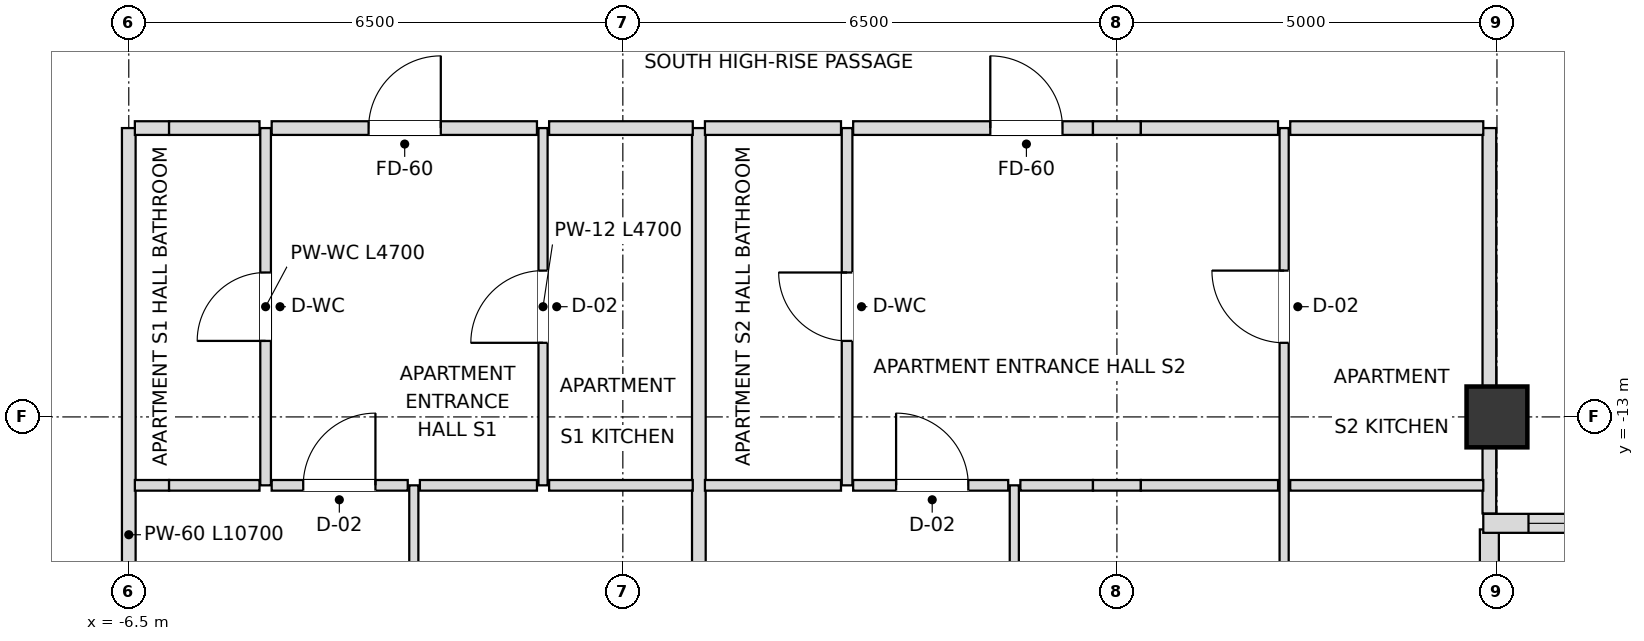
"""IFC4 building model, lengths in metres.
Left out: names, types, materials, properties, quantities, classifications, styles, units other than length and angle.
Written with IfcOpenShell. Run it as: python <this file> out.ifc"""

import sys

from ifc_helpers import new_model, si_unit, direction, frame, frame_2d, origin, origin_2d, place, context, subcontext, project, spatial, rectangle, extrude, element, fill, save


model = new_model("IFC4")
c1 = context("Model", 3, precision=1e-05, world=origin(), true_north=direction((0.0, 1.0)))
c2 = subcontext(c1, "Body", "Model", "MODEL_VIEW")
j1 = project(units=[si_unit("LENGTHUNIT", "METRE"), si_unit("PLANEANGLEUNIT", "RADIAN")], contexts=[c1])
p1 = place(None, origin())
s1 = spatial("IfcSite", under=j1, at=p1, CompositionType="ELEMENT")
p2 = place(p1, origin())
s2 = spatial("IfcBuilding", under=s1, at=p2, CompositionType="ELEMENT")
p3 = place(p2, frame((0.0, 0.0, 301.5)))
s3 = spatial("IfcBuildingStorey", under=s2, at=p3, CompositionType="ELEMENT", Elevation=301.5)
p4 = place(p3, frame((11.5, -13.0, 0.0), z_axis=(0.0, 0.0, 1.0), x_axis=(1.0, 0.0, 0.0)))
e1 = element("IfcColumn", 1, at=p4, inside=s3, PredefinedType="COLUMN", context=c2, shape_type="SweptSolid", body=[
    extrude(rectangle(XDim=0.8, YDim=0.8, at=origin_2d()), origin(), (0.0, 0.0, 1.0), 3.6),
])
p5 = place(p3, frame((11.4, -19.82, 0.0), z_axis=(0.0, 0.0, 1.0), x_axis=(0.0, 1.0, 0.0)))
e2 = element("IfcWall", 2, at=p5, inside=s3, PredefinedType="SOLIDWALL", context=c2, shape_type="SweptSolid", body=[
    extrude(rectangle(XDim=5.34, YDim=0.25, at=frame_2d((2.67, 0.0))), origin(), (0.0, 0.0, 1.0), 2.668),
])
p6 = place(p5, frame((1.925, 0.0, 0.72)))
e3 = element("IfcOpeningElement", 3, at=p6, cuts=e2, PredefinedType="OPENING", context=c2, shape_type="SweptSolid", body=[
    extrude(rectangle(XDim=1.8, YDim=1.68, at=frame_2d((0.9, 0.84))), frame((0.0, 0.135, 0.0), z_axis=(0.0, -1.0, 0.0), x_axis=(1.0, 0.0, 0.0)), (0.0, 0.0, 1.0), 0.27),
])
p7 = place(p3, frame((11.32, -14.4, 0.0), z_axis=(0.0, 0.0, 1.0), x_axis=(1.0, 0.0, 0.0)))
e4 = element("IfcWall", 4, at=p7, inside=s3, PredefinedType="SOLIDWALL", context=c2, shape_type="SweptSolid", body=[
    extrude(rectangle(XDim=5.66, YDim=0.25, at=frame_2d((2.83, 0.0))), origin(), (0.0, 0.0, 1.0), 2.668),
])
p8 = place(p7, frame((0.595, 0.0, 0.72)))
e5 = element("IfcOpeningElement", 5, at=p8, cuts=e4, PredefinedType="OPENING", context=c2, shape_type="SweptSolid", body=[
    extrude(rectangle(XDim=1.8, YDim=1.68, at=frame_2d((0.9, 0.84))), frame((0.0, 0.135, 0.0), z_axis=(0.0, -1.0, 0.0), x_axis=(1.0, 0.0, 0.0)), (0.0, 0.0, 1.0), 0.27),
])
p9 = place(p7, frame((3.265, 0.0, 0.72)))
e6 = element("IfcOpeningElement", 6, at=p9, cuts=e4, PredefinedType="OPENING", context=c2, shape_type="SweptSolid", body=[
    extrude(rectangle(XDim=1.8, YDim=1.68, at=frame_2d((0.9, 0.84))), frame((0.0, 0.135, 0.0), z_axis=(0.0, -1.0, 0.0), x_axis=(1.0, 0.0, 0.0)), (0.0, 0.0, 1.0), 0.27),
])
p10 = place(p3, frame((-6.5, -19.9, 0.0), z_axis=(0.0, 0.0, 1.0), x_axis=(0.0, 1.0, 0.0)))
e7 = element("IfcWall", 7, at=p10, inside=s3, PredefinedType="PARTITIONING", context=c2, shape_type="SweptSolid", body=[
    extrude(rectangle(XDim=10.7, YDim=0.18, at=frame_2d((5.35, 0.0))), origin(), (0.0, 0.0, 1.0), 1.485),
])
p11 = place(p3, frame((-4.7, -13.9, 0.0), z_axis=(0.0, 0.0, 1.0), x_axis=(0.0, 1.0, 0.0)))
e8 = element("IfcWall", 8, at=p11, inside=s3, PredefinedType="PARTITIONING", context=c2, shape_type="SweptSolid", body=[
    extrude(rectangle(XDim=4.7, YDim=0.14, at=frame_2d((2.35, 0.0))), origin(), (0.0, 0.0, 1.0), 3.3),
])
p12 = place(p11, frame((1.9, 0.0, 0.0)))
e9 = element("IfcOpeningElement", 9, at=p12, cuts=e8, PredefinedType="OPENING", context=c2, shape_type="SweptSolid", body=[
    extrude(rectangle(XDim=0.9, YDim=2.1, at=frame_2d((0.45, 1.05))), frame((0.0, 0.08, 0.0), z_axis=(0.0, -1.0, 0.0), x_axis=(1.0, 0.0, 0.0)), (0.0, 0.0, 1.0), 0.16),
])
p13 = place(p3, frame((-2.75, -19.9, 0.0), z_axis=(0.0, 0.0, 1.0), x_axis=(0.0, 1.0, 0.0)))
e10 = element("IfcWall", 10, at=p13, inside=s3, PredefinedType="PARTITIONING", context=c2, shape_type="SweptSolid", body=[
    extrude(rectangle(XDim=6.0, YDim=0.12, at=frame_2d((3.0, 0.0))), origin(), (0.0, 0.0, 1.0), 3.3),
])
p14 = place(p13, frame((2.55, 0.0, 0.0)))
e11 = element("IfcOpeningElement", 11, at=p14, cuts=e10, PredefinedType="OPENING", context=c2, shape_type="SweptSolid", body=[
    extrude(rectangle(XDim=0.9, YDim=2.1, at=frame_2d((0.45, 1.05))), frame((0.0, 0.07, 0.0), z_axis=(0.0, -1.0, 0.0), x_axis=(1.0, 0.0, 0.0)), (0.0, 0.0, 1.0), 0.14),
])
p15 = place(p3, frame((-1.05, -13.9, 0.0), z_axis=(0.0, 0.0, 1.0), x_axis=(0.0, 1.0, 0.0)))
e12 = element("IfcWall", 12, at=p15, inside=s3, PredefinedType="PARTITIONING", context=c2, shape_type="SweptSolid", body=[
    extrude(rectangle(XDim=4.7, YDim=0.12, at=frame_2d((2.35, 0.0))), origin(), (0.0, 0.0, 1.0), 3.3),
])
p16 = place(p15, frame((1.875, 0.0, 0.0)))
e13 = element("IfcOpeningElement", 13, at=p16, cuts=e12, PredefinedType="OPENING", context=c2, shape_type="SweptSolid", body=[
    extrude(rectangle(XDim=0.95, YDim=2.1, at=frame_2d((0.475, 1.05))), frame((0.0, 0.07, 0.0), z_axis=(0.0, -1.0, 0.0), x_axis=(1.0, 0.0, 0.0)), (0.0, 0.0, 1.0), 0.14),
])
p17 = place(p3, frame((1.0, -19.9, 0.0), z_axis=(0.0, 0.0, 1.0), x_axis=(0.0, 1.0, 0.0)))
e14 = element("IfcWall", 14, at=p17, inside=s3, PredefinedType="PARTITIONING", context=c2, shape_type="SweptSolid", body=[
    extrude(rectangle(XDim=10.7, YDim=0.18, at=frame_2d((5.35, 0.0))), origin(), (0.0, 0.0, 1.0), 3.3),
])
p18 = place(p3, frame((2.95, -13.9, 0.0), z_axis=(0.0, 0.0, 1.0), x_axis=(0.0, 1.0, 0.0)))
e15 = element("IfcWall", 15, at=p18, inside=s3, PredefinedType="PARTITIONING", context=c2, shape_type="SweptSolid", body=[
    extrude(rectangle(XDim=4.7, YDim=0.14, at=frame_2d((2.35, 0.0))), origin(), (0.0, 0.0, 1.0), 3.3),
])
p19 = place(p18, frame((1.9, 0.0, 0.0)))
e16 = element("IfcOpeningElement", 16, at=p19, cuts=e15, PredefinedType="OPENING", context=c2, shape_type="SweptSolid", body=[
    extrude(rectangle(XDim=0.9, YDim=2.1, at=frame_2d((0.45, 1.05))), frame((0.0, 0.08, 0.0), z_axis=(0.0, -1.0, 0.0), x_axis=(1.0, 0.0, 0.0)), (0.0, 0.0, 1.0), 0.16),
])
p20 = place(p3, frame((5.15, -19.9, 0.0), z_axis=(0.0, 0.0, 1.0), x_axis=(0.0, 1.0, 0.0)))
e17 = element("IfcWall", 17, at=p20, inside=s3, PredefinedType="PARTITIONING", context=c2, shape_type="SweptSolid", body=[
    extrude(rectangle(XDim=6.0, YDim=0.12, at=frame_2d((3.0, 0.0))), origin(), (0.0, 0.0, 1.0), 3.3),
])
p21 = place(p20, frame((2.55, 0.0, 0.0)))
e18 = element("IfcOpeningElement", 18, at=p21, cuts=e17, PredefinedType="OPENING", context=c2, shape_type="SweptSolid", body=[
    extrude(rectangle(XDim=0.9, YDim=2.1, at=frame_2d((0.45, 1.05))), frame((0.0, 0.07, 0.0), z_axis=(0.0, -1.0, 0.0), x_axis=(1.0, 0.0, 0.0)), (0.0, 0.0, 1.0), 0.14),
])
p22 = place(p3, frame((8.7, -19.9, 0.0), z_axis=(0.0, 0.0, 1.0), x_axis=(0.0, 1.0, 0.0)))
e19 = element("IfcWall", 19, at=p22, inside=s3, PredefinedType="PARTITIONING", context=c2, shape_type="SweptSolid", body=[
    extrude(rectangle(XDim=10.7, YDim=0.12, at=frame_2d((5.35, 0.0))), origin(), (0.0, 0.0, 1.0), 2.353),
])
p23 = place(p22, frame((7.875, 0.0, 0.0)))
e20 = element("IfcOpeningElement", 20, at=p23, cuts=e19, PredefinedType="OPENING", context=c2, shape_type="SweptSolid", body=[
    extrude(rectangle(XDim=0.95, YDim=2.1, at=frame_2d((0.475, 1.05))), frame((0.0, 0.07, 0.0), z_axis=(0.0, -1.0, 0.0), x_axis=(1.0, 0.0, 0.0)), (0.0, 0.0, 1.0), 0.14),
])
p24 = place(p22, frame((2.55, 0.0, 0.0)))
e21 = element("IfcOpeningElement", 21, at=p24, cuts=e19, PredefinedType="OPENING", context=c2, shape_type="SweptSolid", body=[
    extrude(rectangle(XDim=0.9, YDim=2.1, at=frame_2d((0.45, 1.05))), frame((0.0, 0.07, 0.0), z_axis=(0.0, -1.0, 0.0), x_axis=(1.0, 0.0, 0.0)), (0.0, 0.0, 1.0), 0.14),
])
p25 = place(p3, frame((11.4, -14.27, 0.0), z_axis=(0.0, 0.0, 1.0), x_axis=(0.0, 1.0, 0.0)))
e22 = element("IfcWall", 22, at=p25, inside=s3, PredefinedType="PARTITIONING", context=c2, shape_type="SweptSolid", body=[
    extrude(rectangle(XDim=5.07, YDim=0.18, at=frame_2d((2.535, 0.0))), origin(), (0.0, 0.0, 1.0), 2.353),
])
p26 = place(p3, frame((-6.42, -13.9, 0.0), z_axis=(0.0, 0.0, 1.0), x_axis=(1.0, 0.0, 0.0)))
e23 = element("IfcWall", 23, at=p26, inside=s3, PredefinedType="PARTITIONING", context=c2, shape_type="SweptSolid", body=[
    extrude(rectangle(XDim=0.45, YDim=0.14, at=frame_2d((0.225, 0.0))), origin(), (0.0, 0.0, 1.0), 1.485),
])
p27 = place(p3, frame((-5.97, -13.9, 0.0), z_axis=(0.0, 0.0, 1.0), x_axis=(1.0, 0.0, 0.0)))
e24 = element("IfcWall", 24, at=p27, inside=s3, PredefinedType="PARTITIONING", context=c2, shape_type="SweptSolid", body=[
    extrude(rectangle(XDim=1.19, YDim=0.14, at=frame_2d((0.595, 0.0))), origin(), (0.0, 0.0, 1.0), 3.3),
])
p28 = place(p3, frame((-4.62, -13.9, 0.0), z_axis=(0.0, 0.0, 1.0), x_axis=(1.0, 0.0, 0.0)))
e25 = element("IfcWall", 25, at=p28, inside=s3, PredefinedType="PARTITIONING", context=c2, shape_type="SweptSolid", body=[
    extrude(rectangle(XDim=1.79, YDim=0.14, at=frame_2d((0.895, 0.0))), origin(), (0.0, 0.0, 1.0), 3.3),
])
p29 = place(p28, frame((0.415, 0.0, 0.0)))
e26 = element("IfcOpeningElement", 26, at=p29, cuts=e25, PredefinedType="OPENING", context=c2, shape_type="SweptSolid", body=[
    extrude(rectangle(XDim=0.95, YDim=2.1, at=frame_2d((0.475, 1.05))), frame((0.0, 0.08, 0.0), z_axis=(0.0, -1.0, 0.0), x_axis=(1.0, 0.0, 0.0)), (0.0, 0.0, 1.0), 0.16),
])
p30 = place(p3, frame((-2.67, -13.9, 0.0), z_axis=(0.0, 0.0, 1.0), x_axis=(1.0, 0.0, 0.0)))
e27 = element("IfcWall", 27, at=p30, inside=s3, PredefinedType="PARTITIONING", context=c2, shape_type="SweptSolid", body=[
    extrude(rectangle(XDim=1.54, YDim=0.14, at=frame_2d((0.77, 0.0))), origin(), (0.0, 0.0, 1.0), 3.3),
])
p31 = place(p3, frame((-0.97, -13.9, 0.0), z_axis=(0.0, 0.0, 1.0), x_axis=(1.0, 0.0, 0.0)))
e28 = element("IfcWall", 28, at=p31, inside=s3, PredefinedType="PARTITIONING", context=c2, shape_type="SweptSolid", body=[
    extrude(rectangle(XDim=1.89, YDim=0.14, at=frame_2d((0.945, 0.0))), origin(), (0.0, 0.0, 1.0), 3.3),
])
p32 = place(p3, frame((1.08, -13.9, 0.0), z_axis=(0.0, 0.0, 1.0), x_axis=(1.0, 0.0, 0.0)))
e29 = element("IfcWall", 29, at=p32, inside=s3, PredefinedType="PARTITIONING", context=c2, shape_type="SweptSolid", body=[
    extrude(rectangle(XDim=1.79, YDim=0.14, at=frame_2d((0.895, 0.0))), origin(), (0.0, 0.0, 1.0), 3.3),
])
p33 = place(p3, frame((3.03, -13.9, 0.0), z_axis=(0.0, 0.0, 1.0), x_axis=(1.0, 0.0, 0.0)))
e30 = element("IfcWall", 30, at=p33, inside=s3, PredefinedType="PARTITIONING", context=c2, shape_type="SweptSolid", body=[
    extrude(rectangle(XDim=2.04, YDim=0.14, at=frame_2d((1.02, 0.0))), origin(), (0.0, 0.0, 1.0), 3.3),
])
p34 = place(p33, frame((0.565, 0.0, 0.0)))
e31 = element("IfcOpeningElement", 31, at=p34, cuts=e30, PredefinedType="OPENING", context=c2, shape_type="SweptSolid", body=[
    extrude(rectangle(XDim=0.95, YDim=2.1, at=frame_2d((0.475, 1.05))), frame((0.0, 0.08, 0.0), z_axis=(0.0, -1.0, 0.0), x_axis=(1.0, 0.0, 0.0)), (0.0, 0.0, 1.0), 0.16),
])
p35 = place(p3, frame((5.23, -13.9, 0.0), z_axis=(0.0, 0.0, 1.0), x_axis=(1.0, 0.0, 0.0)))
e32 = element("IfcWall", 32, at=p35, inside=s3, PredefinedType="PARTITIONING", context=c2, shape_type="SweptSolid", body=[
    extrude(rectangle(XDim=0.955, YDim=0.14, at=frame_2d((0.478, 0.0))), origin(), (0.0, 0.0, 1.0), 3.3),
])
p36 = place(p3, frame((6.185, -13.9, 0.0), z_axis=(0.0, 0.0, 1.0), x_axis=(1.0, 0.0, 0.0)))
e33 = element("IfcWall", 33, at=p36, inside=s3, PredefinedType="PARTITIONING", context=c2, shape_type="SweptSolid", body=[
    extrude(rectangle(XDim=0.63, YDim=0.14, at=frame_2d((0.315, 0.0))), origin(), (0.0, 0.0, 1.0), 1.485),
])
p37 = place(p3, frame((6.815, -13.9, 0.0), z_axis=(0.0, 0.0, 1.0), x_axis=(1.0, 0.0, 0.0)))
e34 = element("IfcWall", 34, at=p37, inside=s3, PredefinedType="PARTITIONING", context=c2, shape_type="SweptSolid", body=[
    extrude(rectangle(XDim=1.805, YDim=0.14, at=frame_2d((0.903, 0.0))), origin(), (0.0, 0.0, 1.0), 3.3),
])
p38 = place(p3, frame((8.78, -13.9, 0.0), z_axis=(0.0, 0.0, 1.0), x_axis=(1.0, 0.0, 0.0)))
e35 = element("IfcWall", 35, at=p38, inside=s3, PredefinedType="PARTITIONING", context=c2, shape_type="SweptSolid", body=[
    extrude(rectangle(XDim=2.54, YDim=0.14, at=frame_2d((1.27, 0.0))), origin(), (0.0, 0.0, 1.0), 3.3),
])
p39 = place(p3, frame((-6.42, -9.2, 0.0), z_axis=(0.0, 0.0, 1.0), x_axis=(1.0, 0.0, 0.0)))
e36 = element("IfcWall", 36, at=p39, inside=s3, PredefinedType="PARTITIONING", context=c2, shape_type="SweptSolid", body=[
    extrude(rectangle(XDim=0.45, YDim=0.18, at=frame_2d((0.225, 0.0))), origin(), (0.0, 0.0, 1.0), 1.485),
])
p40 = place(p3, frame((-5.97, -9.2, 0.0), z_axis=(0.0, 0.0, 1.0), x_axis=(1.0, 0.0, 0.0)))
e37 = element("IfcWall", 37, at=p40, inside=s3, PredefinedType="PARTITIONING", context=c2, shape_type="SweptSolid", body=[
    extrude(rectangle(XDim=1.19, YDim=0.18, at=frame_2d((0.595, 0.0))), origin(), (0.0, 0.0, 1.0), 3.3),
])
p41 = place(p3, frame((-4.62, -9.2, 0.0), z_axis=(0.0, 0.0, 1.0), x_axis=(1.0, 0.0, 0.0)))
e38 = element("IfcWall", 38, at=p41, inside=s3, PredefinedType="PARTITIONING", context=c2, shape_type="SweptSolid", body=[
    extrude(rectangle(XDim=3.49, YDim=0.18, at=frame_2d((1.745, 0.0))), origin(), (0.0, 0.0, 1.0), 3.3),
])
p42 = place(p41, frame((1.275, 0.0, 0.0)))
e39 = element("IfcOpeningElement", 39, at=p42, cuts=e38, PredefinedType="OPENING", context=c2, shape_type="SweptSolid", body=[
    extrude(rectangle(XDim=0.95, YDim=2.15, at=frame_2d((0.475, 1.075))), frame((0.0, 0.1, 0.0), z_axis=(0.0, -1.0, 0.0), x_axis=(1.0, 0.0, 0.0)), (0.0, 0.0, 1.0), 0.2),
])
p43 = place(p3, frame((-0.97, -9.2, 0.0), z_axis=(0.0, 0.0, 1.0), x_axis=(1.0, 0.0, 0.0)))
e40 = element("IfcWall", 40, at=p43, inside=s3, PredefinedType="PARTITIONING", context=c2, shape_type="SweptSolid", body=[
    extrude(rectangle(XDim=1.89, YDim=0.18, at=frame_2d((0.945, 0.0))), origin(), (0.0, 0.0, 1.0), 3.3),
])
p44 = place(p3, frame((1.08, -9.2, 0.0), z_axis=(0.0, 0.0, 1.0), x_axis=(1.0, 0.0, 0.0)))
e41 = element("IfcWall", 41, at=p44, inside=s3, PredefinedType="PARTITIONING", context=c2, shape_type="SweptSolid", body=[
    extrude(rectangle(XDim=1.79, YDim=0.18, at=frame_2d((0.895, 0.0))), origin(), (0.0, 0.0, 1.0), 3.3),
])
p45 = place(p3, frame((3.03, -9.2, 0.0), z_axis=(0.0, 0.0, 1.0), x_axis=(1.0, 0.0, 0.0)))
e42 = element("IfcWall", 42, at=p45, inside=s3, PredefinedType="PARTITIONING", context=c2, shape_type="SweptSolid", body=[
    extrude(rectangle(XDim=3.155, YDim=0.18, at=frame_2d((1.578, 0.0))), origin(), (0.0, 0.0, 1.0), 3.3),
])
p46 = place(p45, frame((1.804, 0.0, 0.0)))
e43 = element("IfcOpeningElement", 43, at=p46, cuts=e42, PredefinedType="OPENING", context=c2, shape_type="SweptSolid", body=[
    extrude(rectangle(XDim=0.95, YDim=2.15, at=frame_2d((0.475, 1.075))), frame((0.0, 0.1, 0.0), z_axis=(0.0, -1.0, 0.0), x_axis=(1.0, 0.0, 0.0)), (0.0, 0.0, 1.0), 0.2),
])
p47 = place(p3, frame((6.185, -9.2, 0.0), z_axis=(0.0, 0.0, 1.0), x_axis=(1.0, 0.0, 0.0)))
e44 = element("IfcWall", 44, at=p47, inside=s3, PredefinedType="PARTITIONING", context=c2, shape_type="SweptSolid", body=[
    extrude(rectangle(XDim=0.63, YDim=0.18, at=frame_2d((0.315, 0.0))), origin(), (0.0, 0.0, 1.0), 1.485),
])
p48 = place(p3, frame((6.815, -9.2, 0.0), z_axis=(0.0, 0.0, 1.0), x_axis=(1.0, 0.0, 0.0)))
e45 = element("IfcWall", 45, at=p48, inside=s3, PredefinedType="PARTITIONING", context=c2, shape_type="SweptSolid", body=[
    extrude(rectangle(XDim=1.805, YDim=0.18, at=frame_2d((0.903, 0.0))), origin(), (0.0, 0.0, 1.0), 3.3),
])
p49 = place(p3, frame((8.78, -9.2, 0.0), z_axis=(0.0, 0.0, 1.0), x_axis=(1.0, 0.0, 0.0)))
e46 = element("IfcWall", 46, at=p49, inside=s3, PredefinedType="PARTITIONING", context=c2, shape_type="SweptSolid", body=[
    extrude(rectangle(XDim=2.54, YDim=0.18, at=frame_2d((1.27, 0.0))), origin(), (0.0, 0.0, 1.0), 3.3),
])
p50 = place(p8, origin())
e47 = element("IfcWindow", 47, at=p50, inside=s3, PartitioningType="SINGLE_PANEL", PredefinedType="WINDOW", context=c2, shape_type="SweptSolid", body=[
    extrude(rectangle(XDim=1.8, YDim=1.68, at=frame_2d((0.9, 0.84))), frame((0.0, 0.03, 0.0), z_axis=(0.0, -1.0, 0.0), x_axis=(1.0, 0.0, 0.0)), (0.0, 0.0, 1.0), 0.06),
])
fill(e5, e47)
p51 = place(p12, origin())
e48 = element("IfcDoor", 48, at=p51, inside=s3, OperationType="SINGLE_SWING_LEFT", PredefinedType="DOOR", context=c2, shape_type="SweptSolid", body=[
    extrude(rectangle(XDim=0.9, YDim=2.1, at=frame_2d((0.45, 1.05))), frame((0.0, 0.025, 0.0), z_axis=(0.0, -1.0, 0.0), x_axis=(1.0, 0.0, 0.0)), (0.0, 0.0, 1.0), 0.05),
])
fill(e9, e48)
p52 = place(p42, origin())
e49 = element("IfcDoor", 49, at=p52, inside=s3, OperationType="SINGLE_SWING_RIGHT", PredefinedType="DOOR", context=c2, shape_type="SweptSolid", body=[
    extrude(rectangle(XDim=0.95, YDim=2.15, at=frame_2d((0.475, 1.075))), frame((0.0, 0.025, 0.0), z_axis=(0.0, -1.0, 0.0), x_axis=(1.0, 0.0, 0.0)), (0.0, 0.0, 1.0), 0.05),
])
fill(e39, e49)
p53 = place(p16, origin())
e50 = element("IfcDoor", 50, at=p53, inside=s3, OperationType="SINGLE_SWING_LEFT", PredefinedType="DOOR", context=c2, shape_type="SweptSolid", body=[
    extrude(rectangle(XDim=0.95, YDim=2.1, at=frame_2d((0.475, 1.05))), frame((0.0, 0.025, 0.0), z_axis=(0.0, -1.0, 0.0), x_axis=(1.0, 0.0, 0.0)), (0.0, 0.0, 1.0), 0.05),
])
fill(e13, e50)
p54 = place(p29, origin())
e51 = element("IfcDoor", 51, at=p54, inside=s3, OperationType="SINGLE_SWING_RIGHT", PredefinedType="DOOR", context=c2, shape_type="SweptSolid", body=[
    extrude(rectangle(XDim=0.95, YDim=2.1, at=frame_2d((0.475, 1.05))), frame((0.0, 0.025, 0.0), z_axis=(0.0, -1.0, 0.0), x_axis=(1.0, 0.0, 0.0)), (0.0, 0.0, 1.0), 0.05),
])
fill(e26, e51)
p55 = place(p19, origin())
e52 = element("IfcDoor", 52, at=p55, inside=s3, OperationType="SINGLE_SWING_RIGHT", PredefinedType="DOOR", context=c2, shape_type="SweptSolid", body=[
    extrude(rectangle(XDim=0.9, YDim=2.1, at=frame_2d((0.45, 1.05))), frame((0.0, 0.025, 0.0), z_axis=(0.0, -1.0, 0.0), x_axis=(1.0, 0.0, 0.0)), (0.0, 0.0, 1.0), 0.05),
])
fill(e16, e52)
p56 = place(p46, origin())
e53 = element("IfcDoor", 53, at=p56, inside=s3, OperationType="SINGLE_SWING_LEFT", PredefinedType="DOOR", context=c2, shape_type="SweptSolid", body=[
    extrude(rectangle(XDim=0.95, YDim=2.15, at=frame_2d((0.475, 1.075))), frame((0.0, 0.025, 0.0), z_axis=(0.0, -1.0, 0.0), x_axis=(1.0, 0.0, 0.0)), (0.0, 0.0, 1.0), 0.05),
])
fill(e43, e53)
p57 = place(p23, origin())
e54 = element("IfcDoor", 54, at=p57, inside=s3, OperationType="SINGLE_SWING_RIGHT", PredefinedType="DOOR", context=c2, shape_type="SweptSolid", body=[
    extrude(rectangle(XDim=0.95, YDim=2.1, at=frame_2d((0.475, 1.05))), frame((0.0, 0.025, 0.0), z_axis=(0.0, -1.0, 0.0), x_axis=(1.0, 0.0, 0.0)), (0.0, 0.0, 1.0), 0.05),
])
fill(e20, e54)
p58 = place(p34, origin())
e55 = element("IfcDoor", 55, at=p58, inside=s3, OperationType="SINGLE_SWING_LEFT", PredefinedType="DOOR", context=c2, shape_type="SweptSolid", body=[
    extrude(rectangle(XDim=0.95, YDim=2.1, at=frame_2d((0.475, 1.05))), frame((0.0, 0.025, 0.0), z_axis=(0.0, -1.0, 0.0), x_axis=(1.0, 0.0, 0.0)), (0.0, 0.0, 1.0), 0.05),
])
fill(e31, e55)
save(model, sys.argv[1])
